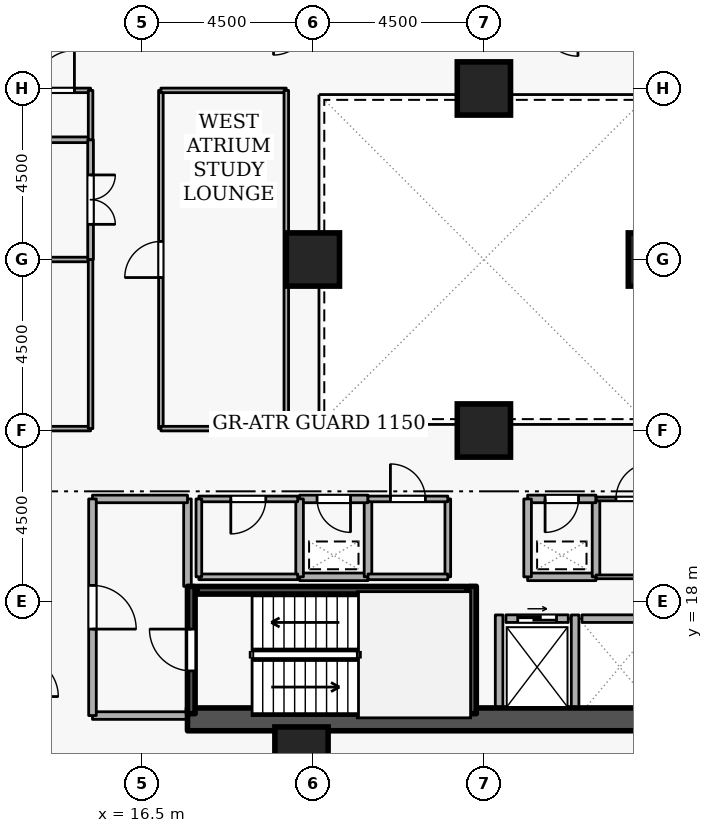
"""IFC4 building model, lengths in metres.
Left out: names, types, materials, properties, quantities, classifications, styles, units other than length and angle.
Written with IfcOpenShell. Run it as: python <this file> out.ifc"""

import sys

from ifc_helpers import new_model, si_unit, direction, frame, frame_2d, origin, origin_2d, place, context, subcontext, project, spatial, rectangle, extrude, element, fill, save


model = new_model("IFC4")
c1 = context("Model", 3, precision=1e-05, world=origin(), true_north=direction((0.0, 1.0)))
c2 = subcontext(c1, "Body", "Model", "MODEL_VIEW")
j1 = project(units=[si_unit("LENGTHUNIT", "METRE"), si_unit("PLANEANGLEUNIT", "RADIAN")], contexts=[c1])
p1 = place(None, origin())
s1 = spatial("IfcSite", under=j1, at=p1, CompositionType="ELEMENT")
p2 = place(p1, origin())
s2 = spatial("IfcBuilding", under=s1, at=p2, CompositionType="ELEMENT")
p3 = place(p2, frame((0.0, 0.0, 45.9)))
s3 = spatial("IfcBuildingStorey", under=s2, at=p3, CompositionType="ELEMENT", Elevation=45.9)
p4 = place(p3, frame((17.7, 14.9, 0.0), z_axis=(0.0, 0.0, 1.0), x_axis=(1.0, 0.0, 0.0)))
e1 = element("IfcWall", 1, at=p4, inside=s3, PredefinedType="SHEAR", context=c2, shape_type="SweptSolid", body=[
    extrude(rectangle(XDim=15.6, YDim=0.6, at=frame_2d((7.8, 0.0))), origin(), (0.0, 0.0, 1.0), 3.6),
])
for number, where, z_axis, x_axis in (
    (2, (20.7, 14.0, 0.0), (0.0, 0.0, 1.0), (1.0, 0.0, 0.0)),
    (3, (25.5, 22.5, 0.0), (0.0, 0.0, 1.0), (1.0, 0.0, 0.0)),
    (4, (25.5, 31.5, 0.0), (0.0, 0.0, 1.0), (1.0, 0.0, 0.0)),
    (5, (21.0, 27.0, 0.0), (0.0, 0.0, 1.0), (1.0, 0.0, 0.0)),
    (6, (30.0, 27.0, 0.0), (0.0, 0.0, 1.0), (1.0, 0.0, 0.0)),
):
    element("IfcColumn", number, at=place(p3, frame(where, z_axis=z_axis, x_axis=x_axis)), inside=s3, PredefinedType="COLUMN", context=c2, shape_type="SweptSolid", body=[
        extrude(rectangle(XDim=1.4, YDim=1.4, at=origin_2d()), origin(), (0.0, 0.0, 1.0), 3.6),
    ])
p5 = place(p3, frame((26.08, 17.55, 0.0), z_axis=(0.0, 0.0, 1.0), x_axis=(1.0, 0.0, 0.0)))
e7 = element("IfcWall", 7, at=p5, inside=s3, PredefinedType="STANDARD", context=c2, shape_type="SweptSolid", body=[
    extrude(rectangle(XDim=1.64, YDim=0.2, at=frame_2d((0.82, 0.0))), origin(), (0.0, 0.0, 1.0), 3.26),
])
p6 = place(p5, frame((0.31, 0.0, 0.0)))
e8 = element("IfcOpeningElement", 8, at=p6, cuts=e7, PredefinedType="OPENING", context=c2, shape_type="SweptSolid", body=[
    extrude(rectangle(XDim=1.02, YDim=2.06, at=frame_2d((0.51, 1.03))), frame((0.0, 0.11, 0.0), z_axis=(0.0, -1.0, 0.0), x_axis=(1.0, 0.0, 0.0)), (0.0, 0.0, 1.0), 0.22),
])
p7 = place(p3, frame((28.08, 17.55, 0.0), z_axis=(0.0, 0.0, 1.0), x_axis=(1.0, 0.0, 0.0)))
e9 = element("IfcWall", 9, at=p7, inside=s3, PredefinedType="STANDARD", context=c2, shape_type="SweptSolid", body=[
    extrude(rectangle(XDim=1.99, YDim=0.2, at=frame_2d((0.995, 0.0))), origin(), (0.0, 0.0, 1.0), 3.26),
])
p8 = place(p3, frame((27.9, 15.212, 0.0), z_axis=(0.0, 0.0, 1.0), x_axis=(0.0, 1.0, 0.0)))
e10 = element("IfcWall", 10, at=p8, inside=s3, PredefinedType="STANDARD", context=c2, shape_type="SweptSolid", body=[
    extrude(rectangle(XDim=2.436, YDim=0.2, at=frame_2d((1.218, 0.0))), origin(), (0.0, 0.0, 1.0), 3.26),
])
p9 = place(p3, frame((25.9, 15.212, 0.0), z_axis=(0.0, 0.0, 1.0), x_axis=(0.0, 1.0, 0.0)))
e11 = element("IfcWall", 11, at=p9, inside=s3, PredefinedType="STANDARD", context=c2, shape_type="SweptSolid", body=[
    extrude(rectangle(XDim=2.436, YDim=0.2, at=frame_2d((1.218, 0.0))), origin(), (0.0, 0.0, 1.0), 1.685),
])
p10 = place(p3, frame((17.8, 15.05, 0.0), z_axis=(0.0, 0.0, 1.0), x_axis=(0.0, 1.0, 0.0)))
e12 = element("IfcWall", 12, at=p10, inside=s3, PredefinedType="SHEAR", context=c2, shape_type="SweptSolid", body=[
    extrude(rectangle(XDim=3.35, YDim=0.2, at=frame_2d((1.675, 0.0))), origin(), (0.0, 0.0, 1.0), 3.6),
])
p11 = place(p10, frame((1.125, 0.0, 0.0)))
e13 = element("IfcOpeningElement", 13, at=p11, cuts=e12, PredefinedType="OPENING", context=c2, shape_type="SweptSolid", body=[
    extrude(rectangle(XDim=1.1, YDim=2.1, at=frame_2d((0.55, 1.05))), frame((0.0, 0.11, 0.0), z_axis=(0.0, -1.0, 0.0), x_axis=(1.0, 0.0, 0.0)), (0.0, 0.0, 1.0), 0.22),
])
p12 = place(p3, frame((25.2, 18.4, 0.0), z_axis=(0.0, 0.0, 1.0), x_axis=(0.0, -1.0, 0.0)))
e14 = element("IfcWall", 14, at=p12, inside=s3, PredefinedType="SHEAR", context=c2, shape_type="SweptSolid", body=[
    extrude(rectangle(XDim=3.35, YDim=0.2, at=frame_2d((1.675, 0.0))), origin(), (0.0, 0.0, 1.0), 3.6),
])
p13 = place(p3, frame((25.05, 18.297, 0.0), z_axis=(0.0, 0.0, 1.0), x_axis=(-1.0, 0.0, 0.0)))
e15 = element("IfcWall", 15, at=p13, inside=s3, PredefinedType="SHEAR", context=c2, shape_type="SweptSolid", body=[
    extrude(rectangle(XDim=7.1, YDim=0.2, at=frame_2d((3.55, 0.0))), origin(), (0.0, 0.0, 1.0), 3.6),
])
p14 = place(p3, frame((15.2, 15.0, 0.0), z_axis=(0.0, 0.0, 1.0), x_axis=(1.0, 0.0, 0.0)))
e16 = element("IfcWall", 16, at=p14, inside=s3, PredefinedType="STANDARD", context=c2, shape_type="SweptSolid", body=[
    extrude(rectangle(XDim=2.5, YDim=0.2, at=frame_2d((1.25, 0.0))), origin(), (0.0, 0.0, 1.0), 3.26),
])
p15 = place(p3, frame((17.7, 18.4, 0.0), z_axis=(0.0, 0.0, 1.0), x_axis=(0.0, 1.0, 0.0)))
e17 = element("IfcWall", 17, at=p15, inside=s3, PredefinedType="STANDARD", context=c2, shape_type="SweptSolid", body=[
    extrude(rectangle(XDim=2.3, YDim=0.2, at=frame_2d((1.15, 0.0))), origin(), (0.0, 0.0, 1.0), 2.465),
])
p16 = place(p3, frame((17.7, 20.7, 0.0), z_axis=(0.0, 0.0, 1.0), x_axis=(-1.0, 0.0, 0.0)))
e18 = element("IfcWall", 18, at=p16, inside=s3, PredefinedType="STANDARD", context=c2, shape_type="SweptSolid", body=[
    extrude(rectangle(XDim=2.5, YDim=0.2, at=frame_2d((1.25, 0.0))), origin(), (0.0, 0.0, 1.0), 3.26),
])
p17 = place(p3, frame((15.2, 20.7, 0.0), z_axis=(0.0, 0.0, 1.0), x_axis=(0.0, -1.0, 0.0)))
e19 = element("IfcWall", 19, at=p17, inside=s3, PredefinedType="STANDARD", context=c2, shape_type="SweptSolid", body=[
    extrude(rectangle(XDim=5.7, YDim=0.2, at=frame_2d((2.85, 0.0))), origin(), (0.0, 0.0, 1.0), 3.26),
])
p18 = place(p17, frame((2.275, 0.0, 0.0)))
e20 = element("IfcOpeningElement", 20, at=p18, cuts=e19, PredefinedType="OPENING", context=c2, shape_type="SweptSolid", body=[
    extrude(rectangle(XDim=1.15, YDim=2.1, at=frame_2d((0.575, 1.05))), frame((0.0, 0.11, 0.0), z_axis=(0.0, -1.0, 0.0), x_axis=(1.0, 0.0, 0.0)), (0.0, 0.0, 1.0), 0.22),
])
p19 = place(p3, frame((26.65, 18.65, 0.0), z_axis=(0.0, 0.0, 1.0), x_axis=(1.0, 0.0, 0.0)))
e21 = element("IfcWall", 21, at=p19, inside=s3, PredefinedType="STANDARD", context=c2, shape_type="SweptSolid", body=[
    extrude(rectangle(XDim=1.8, YDim=0.2, at=frame_2d((0.9, 0.0))), origin(), (0.0, 0.0, 1.0), 3.26),
])
p20 = place(p3, frame((28.45, 18.65, 0.0), z_axis=(0.0, 0.0, 1.0), x_axis=(0.0, 1.0, 0.0)))
e22 = element("IfcWall", 22, at=p20, inside=s3, PredefinedType="STANDARD", context=c2, shape_type="SweptSolid", body=[
    extrude(rectangle(XDim=2.05, YDim=0.2, at=frame_2d((1.025, 0.0))), origin(), (0.0, 0.0, 1.0), 3.26),
])
p21 = place(p3, frame((28.45, 20.7, 0.0), z_axis=(0.0, 0.0, 1.0), x_axis=(-1.0, 0.0, 0.0)))
e23 = element("IfcWall", 23, at=p21, inside=s3, PredefinedType="STANDARD", context=c2, shape_type="SweptSolid", body=[
    extrude(rectangle(XDim=1.8, YDim=0.2, at=frame_2d((0.9, 0.0))), origin(), (0.0, 0.0, 1.0), 3.26),
])
p22 = place(p21, frame((0.46, 0.0, 0.0)))
e24 = element("IfcOpeningElement", 24, at=p22, cuts=e23, PredefinedType="OPENING", context=c2, shape_type="SweptSolid", body=[
    extrude(rectangle(XDim=0.88, YDim=2.04, at=frame_2d((0.44, 1.02))), frame((0.0, 0.11, 0.0), z_axis=(0.0, -1.0, 0.0), x_axis=(1.0, 0.0, 0.0)), (0.0, 0.0, 1.0), 0.22),
])
p23 = place(p3, frame((26.65, 20.7, 0.0), z_axis=(0.0, 0.0, 1.0), x_axis=(0.0, -1.0, 0.0)))
e25 = element("IfcWall", 25, at=p23, inside=s3, PredefinedType="STANDARD", context=c2, shape_type="SweptSolid", body=[
    extrude(rectangle(XDim=2.05, YDim=0.2, at=frame_2d((1.025, 0.0))), origin(), (0.0, 0.0, 1.0), 3.26),
])
p24 = place(p3, frame((20.65, 18.65, 0.0), z_axis=(0.0, 0.0, 1.0), x_axis=(1.0, 0.0, 0.0)))
e26 = element("IfcWall", 26, at=p24, inside=s3, PredefinedType="STANDARD", context=c2, shape_type="SweptSolid", body=[
    extrude(rectangle(XDim=1.8, YDim=0.2, at=frame_2d((0.9, 0.0))), origin(), (0.0, 0.0, 1.0), 3.26),
])
p25 = place(p3, frame((22.45, 18.65, 0.0), z_axis=(0.0, 0.0, 1.0), x_axis=(0.0, 1.0, 0.0)))
e27 = element("IfcWall", 27, at=p25, inside=s3, PredefinedType="STANDARD", context=c2, shape_type="SweptSolid", body=[
    extrude(rectangle(XDim=2.05, YDim=0.2, at=frame_2d((1.025, 0.0))), origin(), (0.0, 0.0, 1.0), 3.26),
])
p26 = place(p3, frame((22.45, 20.7, 0.0), z_axis=(0.0, 0.0, 1.0), x_axis=(-1.0, 0.0, 0.0)))
e28 = element("IfcWall", 28, at=p26, inside=s3, PredefinedType="STANDARD", context=c2, shape_type="SweptSolid", body=[
    extrude(rectangle(XDim=1.8, YDim=0.2, at=frame_2d((0.9, 0.0))), origin(), (0.0, 0.0, 1.0), 3.26),
])
p27 = place(p26, frame((0.46, 0.0, 0.0)))
e29 = element("IfcOpeningElement", 29, at=p27, cuts=e28, PredefinedType="OPENING", context=c2, shape_type="SweptSolid", body=[
    extrude(rectangle(XDim=0.88, YDim=2.04, at=frame_2d((0.44, 1.02))), frame((0.0, 0.11, 0.0), z_axis=(0.0, -1.0, 0.0), x_axis=(1.0, 0.0, 0.0)), (0.0, 0.0, 1.0), 0.22),
])
p28 = place(p3, frame((20.65, 20.7, 0.0), z_axis=(0.0, 0.0, 1.0), x_axis=(0.0, -1.0, 0.0)))
e30 = element("IfcWall", 30, at=p28, inside=s3, PredefinedType="STANDARD", context=c2, shape_type="SweptSolid", body=[
    extrude(rectangle(XDim=2.05, YDim=0.2, at=frame_2d((1.025, 0.0))), origin(), (0.0, 0.0, 1.0), 3.26),
])
p29 = place(p3, frame((18.0, 18.65, 0.0), z_axis=(0.0, 0.0, 1.0), x_axis=(1.0, 0.0, 0.0)))
e31 = element("IfcWall", 31, at=p29, inside=s3, PredefinedType="PARTITIONING", context=c2, shape_type="SweptSolid", body=[
    extrude(rectangle(XDim=2.6, YDim=0.15, at=frame_2d((1.3, 0.0))), origin(), (0.0, 0.0, 1.0), 3.26),
])
p30 = place(p3, frame((20.6, 20.7, 0.0), z_axis=(0.0, 0.0, 1.0), x_axis=(-1.0, 0.0, 0.0)))
e32 = element("IfcWall", 32, at=p30, inside=s3, PredefinedType="PARTITIONING", context=c2, shape_type="SweptSolid", body=[
    extrude(rectangle(XDim=2.6, YDim=0.15, at=frame_2d((1.3, 0.0))), origin(), (0.0, 0.0, 1.0), 3.26),
])
p31 = place(p30, frame((0.84, 0.0, 0.0)))
e33 = element("IfcOpeningElement", 33, at=p31, cuts=e32, PredefinedType="OPENING", context=c2, shape_type="SweptSolid", body=[
    extrude(rectangle(XDim=0.92, YDim=2.08, at=frame_2d((0.46, 1.04))), frame((0.0, 0.085, 0.0), z_axis=(0.0, -1.0, 0.0), x_axis=(1.0, 0.0, 0.0)), (0.0, 0.0, 1.0), 0.17),
])
p32 = place(p3, frame((18.0, 20.7, 0.0), z_axis=(0.0, 0.0, 1.0), x_axis=(0.0, -1.0, 0.0)))
e34 = element("IfcWall", 34, at=p32, inside=s3, PredefinedType="PARTITIONING", context=c2, shape_type="SweptSolid", body=[
    extrude(rectangle(XDim=2.05, YDim=0.15, at=frame_2d((1.025, 0.0))), origin(), (0.0, 0.0, 1.0), 2.465),
])
p33 = place(p3, frame((24.55, 20.7, 0.0), z_axis=(0.0, 0.0, 1.0), x_axis=(0.0, -1.0, 0.0)))
e35 = element("IfcWall", 35, at=p33, inside=s3, PredefinedType="PARTITIONING", context=c2, shape_type="SweptSolid", body=[
    extrude(rectangle(XDim=2.05, YDim=0.15, at=frame_2d((1.025, 0.0))), origin(), (0.0, 0.0, 1.0), 3.26),
])
p34 = place(p3, frame((24.55, 18.65, 0.0), z_axis=(0.0, 0.0, 1.0), x_axis=(-1.0, 0.0, 0.0)))
e36 = element("IfcWall", 36, at=p34, inside=s3, PredefinedType="PARTITIONING", context=c2, shape_type="SweptSolid", body=[
    extrude(rectangle(XDim=2.1, YDim=0.15, at=frame_2d((1.05, 0.0))), origin(), (0.0, 0.0, 1.0), 3.26),
])
p35 = place(p3, frame((22.45, 20.7, 0.0), z_axis=(0.0, 0.0, 1.0), x_axis=(1.0, 0.0, 0.0)))
e37 = element("IfcWall", 37, at=p35, inside=s3, PredefinedType="PARTITIONING", context=c2, shape_type="SweptSolid", body=[
    extrude(rectangle(XDim=2.1, YDim=0.15, at=frame_2d((1.05, 0.0))), origin(), (0.0, 0.0, 1.0), 3.26),
])
p36 = place(p35, frame((0.59, 0.0, 0.0)))
e38 = element("IfcOpeningElement", 38, at=p36, cuts=e37, PredefinedType="OPENING", context=c2, shape_type="SweptSolid", body=[
    extrude(rectangle(XDim=0.92, YDim=2.08, at=frame_2d((0.46, 1.04))), frame((0.0, 0.085, 0.0), z_axis=(0.0, -1.0, 0.0), x_axis=(1.0, 0.0, 0.0)), (0.0, 0.0, 1.0), 0.17),
])
p37 = place(p3, frame((30.45, 18.65, 0.0), z_axis=(0.0, 0.0, 1.0), x_axis=(-1.0, 0.0, 0.0)))
e39 = element("IfcWall", 39, at=p37, inside=s3, PredefinedType="PARTITIONING", context=c2, shape_type="SweptSolid", body=[
    extrude(rectangle(XDim=2.0, YDim=0.1, at=frame_2d((1.0, 0.0))), origin(), (0.0, 0.0, 1.0), 3.26),
])
p38 = place(p3, frame((28.45, 20.7, 0.0), z_axis=(0.0, 0.0, 1.0), x_axis=(1.0, 0.0, 0.0)))
e40 = element("IfcWall", 40, at=p38, inside=s3, PredefinedType="PARTITIONING", context=c2, shape_type="SweptSolid", body=[
    extrude(rectangle(XDim=2.0, YDim=0.1, at=frame_2d((1.0, 0.0))), origin(), (0.0, 0.0, 1.0), 3.26),
])
p39 = place(p38, frame((0.525, 0.0, 0.0)))
e41 = element("IfcOpeningElement", 41, at=p39, cuts=e40, PredefinedType="OPENING", context=c2, shape_type="SweptSolid", body=[
    extrude(rectangle(XDim=0.95, YDim=2.1, at=frame_2d((0.475, 1.05))), frame((0.0, 0.06, 0.0), z_axis=(0.0, -1.0, 0.0), x_axis=(1.0, 0.0, 0.0)), (0.0, 0.0, 1.0), 0.12),
])
p40 = place(p3, frame((15.15, 22.55, 0.0), z_axis=(0.0, 0.0, 1.0), x_axis=(-1.0, 0.0, 0.0)))
e42 = element("IfcWall", 42, at=p40, inside=s3, PredefinedType="PARTITIONING", context=c2, shape_type="SweptSolid", body=[
    extrude(rectangle(XDim=1.9, YDim=0.12, at=frame_2d((0.95, 0.0))), origin(), (0.0, 0.0, 1.0), 3.26),
])
p41 = place(p3, frame((1.28, 27.0, 0.0), z_axis=(0.0, 0.0, 1.0), x_axis=(1.0, 0.0, 0.0)))
e43 = element("IfcWall", 43, at=p41, inside=s3, PredefinedType="PARTITIONING", context=c2, shape_type="SweptSolid", body=[
    extrude(rectangle(XDim=13.87, YDim=0.12, at=frame_2d((6.935, 0.0))), origin(), (0.0, 0.0, 1.0), 2.802),
])
p42 = place(p3, frame((15.15, 27.0, 0.0), z_axis=(0.0, 0.0, 1.0), x_axis=(0.0, -1.0, 0.0)))
e44 = element("IfcWall", 44, at=p42, inside=s3, PredefinedType="PARTITIONING", context=c2, shape_type="SweptSolid", body=[
    extrude(rectangle(XDim=4.45, YDim=0.12, at=frame_2d((2.225, 0.0))), origin(), (0.0, 0.0, 1.0), 3.26),
])
p43 = place(p3, frame((1.28, 30.15, 0.0), z_axis=(0.0, 0.0, 1.0), x_axis=(1.0, 0.0, 0.0)))
e45 = element("IfcWall", 45, at=p43, inside=s3, PredefinedType="PARTITIONING", context=c2, shape_type="SweptSolid", body=[
    extrude(rectangle(XDim=13.87, YDim=0.15, at=frame_2d((6.935, 0.0))), origin(), (0.0, 0.0, 1.0), 3.26),
])
p44 = place(p3, frame((15.15, 30.15, 0.0), z_axis=(0.0, 0.0, 1.0), x_axis=(0.0, -1.0, 0.0)))
e46 = element("IfcWall", 46, at=p44, inside=s3, PredefinedType="PARTITIONING", context=c2, shape_type="SweptSolid", body=[
    extrude(rectangle(XDim=3.15, YDim=0.15, at=frame_2d((1.575, 0.0))), origin(), (0.0, 0.0, 1.0), 3.26),
])
p45 = place(p44, frame((0.925, 0.0, 0.0)))
e47 = element("IfcOpeningElement", 47, at=p45, cuts=e46, PredefinedType="OPENING", context=c2, shape_type="SweptSolid", body=[
    extrude(rectangle(XDim=1.3, YDim=2.12, at=frame_2d((0.65, 1.06))), frame((0.0, 0.085, 0.0), z_axis=(0.0, -1.0, 0.0), x_axis=(1.0, 0.0, 0.0)), (0.0, 0.0, 1.0), 0.17),
])
p46 = place(p3, frame((13.25, 31.45, 0.0), z_axis=(0.0, 0.0, 1.0), x_axis=(1.0, 0.0, 0.0)))
e48 = element("IfcWall", 48, at=p46, inside=s3, PredefinedType="PARTITIONING", context=c2, shape_type="SweptSolid", body=[
    extrude(rectangle(XDim=1.9, YDim=0.12, at=frame_2d((0.95, 0.0))), origin(), (0.0, 0.0, 1.0), 3.26),
])
p47 = place(p46, frame((0.425, 0.0, 0.0)))
e49 = element("IfcOpeningElement", 49, at=p47, cuts=e48, PredefinedType="OPENING", context=c2, shape_type="SweptSolid", body=[
    extrude(rectangle(XDim=1.05, YDim=2.1, at=frame_2d((0.525, 1.05))), frame((0.0, 0.07, 0.0), z_axis=(0.0, -1.0, 0.0), x_axis=(1.0, 0.0, 0.0)), (0.0, 0.0, 1.0), 0.14),
])
p48 = place(p3, frame((15.15, 31.45, 0.0), z_axis=(0.0, 0.0, 1.0), x_axis=(0.0, -1.0, 0.0)))
e50 = element("IfcWall", 50, at=p48, inside=s3, PredefinedType="PARTITIONING", context=c2, shape_type="SweptSolid", body=[
    extrude(rectangle(XDim=1.3, YDim=0.12, at=frame_2d((0.65, 0.0))), origin(), (0.0, 0.0, 1.0), 3.26),
])
p49 = place(p3, frame((17.0, 22.55, 0.0), z_axis=(0.0, 0.0, 1.0), x_axis=(0.0, 1.0, 0.0)))
e51 = element("IfcWall", 51, at=p49, inside=s3, PredefinedType="PARTITIONING", context=c2, shape_type="SweptSolid", body=[
    extrude(rectangle(XDim=8.9, YDim=0.12, at=frame_2d((4.45, 0.0))), origin(), (0.0, 0.0, 1.0), 3.26),
])
p50 = place(p49, frame((3.975, 0.0, 0.0)))
e52 = element("IfcOpeningElement", 52, at=p50, cuts=e51, PredefinedType="OPENING", context=c2, shape_type="SweptSolid", body=[
    extrude(rectangle(XDim=0.95, YDim=2.1, at=frame_2d((0.475, 1.05))), frame((0.0, 0.07, 0.0), z_axis=(0.0, -1.0, 0.0), x_axis=(1.0, 0.0, 0.0)), (0.0, 0.0, 1.0), 0.14),
])
p51 = place(p3, frame((17.0, 31.45, 0.0), z_axis=(0.0, 0.0, 1.0), x_axis=(1.0, 0.0, 0.0)))
e53 = element("IfcWall", 53, at=p51, inside=s3, PredefinedType="PARTITIONING", context=c2, shape_type="SweptSolid", body=[
    extrude(rectangle(XDim=3.3, YDim=0.12, at=frame_2d((1.65, 0.0))), origin(), (0.0, 0.0, 1.0), 3.26),
])
p52 = place(p3, frame((20.3, 31.45, 0.0), z_axis=(0.0, 0.0, 1.0), x_axis=(0.0, -1.0, 0.0)))
e54 = element("IfcWall", 54, at=p52, inside=s3, PredefinedType="PARTITIONING", context=c2, shape_type="SweptSolid", body=[
    extrude(rectangle(XDim=8.9, YDim=0.12, at=frame_2d((4.45, 0.0))), origin(), (0.0, 0.0, 1.0), 3.26),
])
p53 = place(p3, frame((20.3, 22.55, 0.0), z_axis=(0.0, 0.0, 1.0), x_axis=(-1.0, 0.0, 0.0)))
e55 = element("IfcWall", 55, at=p53, inside=s3, PredefinedType="PARTITIONING", context=c2, shape_type="SweptSolid", body=[
    extrude(rectangle(XDim=3.3, YDim=0.12, at=frame_2d((1.65, 0.0))), origin(), (0.0, 0.0, 1.0), 3.26),
])
p54 = place(p6, origin())
e56 = element("IfcDoor", 56, at=p54, inside=s3, OperationType="SLIDING_TO_LEFT", PredefinedType="DOOR", context=c2, shape_type="SweptSolid", body=[
    extrude(rectangle(XDim=1.02, YDim=2.06, at=frame_2d((0.51, 1.03))), frame((0.0, 0.025, 0.0), z_axis=(0.0, -1.0, 0.0), x_axis=(1.0, 0.0, 0.0)), (0.0, 0.0, 1.0), 0.05),
])
fill(e8, e56)
p55 = place(p11, origin())
e57 = element("IfcDoor", 57, at=p55, inside=s3, OperationType="SINGLE_SWING_RIGHT", PredefinedType="DOOR", context=c2, shape_type="SweptSolid", body=[
    extrude(rectangle(XDim=1.1, YDim=2.1, at=frame_2d((0.55, 1.05))), frame((0.0, 0.025, 0.0), z_axis=(0.0, -1.0, 0.0), x_axis=(1.0, 0.0, 0.0)), (0.0, 0.0, 1.0), 0.05),
])
fill(e13, e57)
p56 = place(p18, origin())
e58 = element("IfcDoor", 58, at=p56, inside=s3, OperationType="SINGLE_SWING_RIGHT", PredefinedType="DOOR", context=c2, shape_type="SweptSolid", body=[
    extrude(rectangle(XDim=1.15, YDim=2.1, at=frame_2d((0.575, 1.05))), frame((0.0, 0.025, 0.0), z_axis=(0.0, -1.0, 0.0), x_axis=(1.0, 0.0, 0.0)), (0.0, 0.0, 1.0), 0.05),
])
fill(e20, e58)
p57 = place(p22, origin())
e59 = element("IfcDoor", 59, at=p57, inside=s3, OperationType="SINGLE_SWING_RIGHT", PredefinedType="DOOR", context=c2, shape_type="SweptSolid", body=[
    extrude(rectangle(XDim=0.88, YDim=2.04, at=frame_2d((0.44, 1.02))), frame((0.0, 0.025, 0.0), z_axis=(0.0, -1.0, 0.0), x_axis=(1.0, 0.0, 0.0)), (0.0, 0.0, 1.0), 0.05),
])
fill(e24, e59)
p58 = place(p27, origin())
e60 = element("IfcDoor", 60, at=p58, inside=s3, OperationType="SINGLE_SWING_LEFT", PredefinedType="DOOR", context=c2, shape_type="SweptSolid", body=[
    extrude(rectangle(XDim=0.88, YDim=2.04, at=frame_2d((0.44, 1.02))), frame((0.0, 0.025, 0.0), z_axis=(0.0, -1.0, 0.0), x_axis=(1.0, 0.0, 0.0)), (0.0, 0.0, 1.0), 0.05),
])
fill(e29, e60)
p59 = place(p31, origin())
e61 = element("IfcDoor", 61, at=p59, inside=s3, OperationType="SINGLE_SWING_RIGHT", PredefinedType="DOOR", context=c2, shape_type="SweptSolid", body=[
    extrude(rectangle(XDim=0.92, YDim=2.08, at=frame_2d((0.46, 1.04))), frame((0.0, 0.025, 0.0), z_axis=(0.0, -1.0, 0.0), x_axis=(1.0, 0.0, 0.0)), (0.0, 0.0, 1.0), 0.05),
])
fill(e33, e61)
p60 = place(p36, origin())
e62 = element("IfcDoor", 62, at=p60, inside=s3, OperationType="SINGLE_SWING_LEFT", PredefinedType="DOOR", context=c2, shape_type="SweptSolid", body=[
    extrude(rectangle(XDim=0.92, YDim=2.08, at=frame_2d((0.46, 1.04))), frame((0.0, 0.025, 0.0), z_axis=(0.0, -1.0, 0.0), x_axis=(1.0, 0.0, 0.0)), (0.0, 0.0, 1.0), 0.05),
])
fill(e38, e62)
p61 = place(p39, origin())
e63 = element("IfcDoor", 63, at=p61, inside=s3, OperationType="SINGLE_SWING_RIGHT", PredefinedType="DOOR", context=c2, shape_type="SweptSolid", body=[
    extrude(rectangle(XDim=0.95, YDim=2.1, at=frame_2d((0.475, 1.05))), frame((0.0, 0.025, 0.0), z_axis=(0.0, -1.0, 0.0), x_axis=(1.0, 0.0, 0.0)), (0.0, 0.0, 1.0), 0.05),
])
fill(e41, e63)
p62 = place(p45, origin())
e64 = element("IfcDoor", 64, at=p62, inside=s3, OperationType="DOUBLE_DOOR_SINGLE_SWING", PredefinedType="DOOR", context=c2, shape_type="SweptSolid", body=[
    extrude(rectangle(XDim=1.3, YDim=2.12, at=frame_2d((0.65, 1.06))), frame((0.0, 0.025, 0.0), z_axis=(0.0, -1.0, 0.0), x_axis=(1.0, 0.0, 0.0)), (0.0, 0.0, 1.0), 0.05),
])
fill(e47, e64)
p63 = place(p47, origin())
e65 = element("IfcDoor", 65, at=p63, inside=s3, OperationType="SINGLE_SWING_RIGHT", PredefinedType="DOOR", context=c2, shape_type="SweptSolid", body=[
    extrude(rectangle(XDim=1.05, YDim=2.1, at=frame_2d((0.525, 1.05))), frame((0.0, 0.025, 0.0), z_axis=(0.0, -1.0, 0.0), x_axis=(1.0, 0.0, 0.0)), (0.0, 0.0, 1.0), 0.05),
])
fill(e49, e65)
p64 = place(p50, origin())
e66 = element("IfcDoor", 66, at=p64, inside=s3, OperationType="SINGLE_SWING_LEFT", PredefinedType="DOOR", context=c2, shape_type="SweptSolid", body=[
    extrude(rectangle(XDim=0.95, YDim=2.1, at=frame_2d((0.475, 1.05))), frame((0.0, 0.025, 0.0), z_axis=(0.0, -1.0, 0.0), x_axis=(1.0, 0.0, 0.0)), (0.0, 0.0, 1.0), 0.05),
])
fill(e52, e66)
save(model, sys.argv[1])
